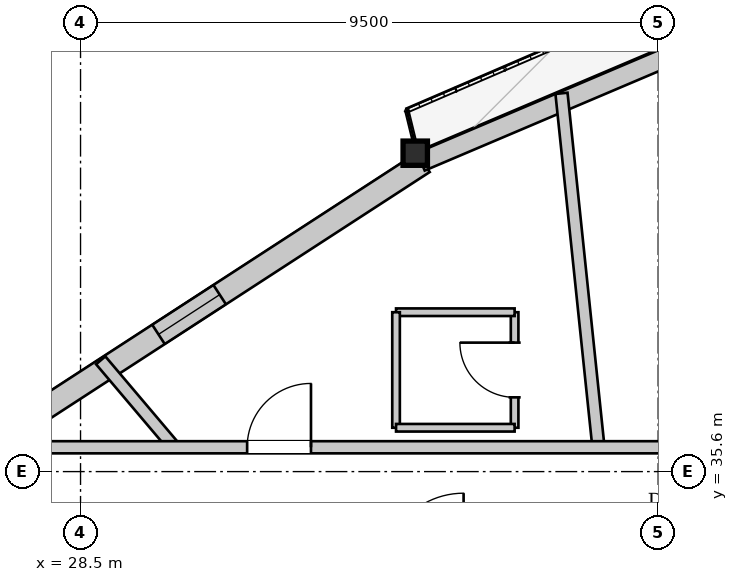
"""IFC4 building model, lengths in metres.
Left out: names, types, materials, properties, quantities, classifications, styles, units other than length and angle.
Written with IfcOpenShell. Run it as: python <this file> out.ifc"""

import sys

from ifc_helpers import new_model, si_unit, direction, frame, frame_2d, origin, origin_2d, place, context, subcontext, project, spatial, rectangle, i_section, extrude, source, transform, mapped, element, fill, save


model = new_model("IFC4")
c1 = context("Model", 3, precision=1e-05, world=origin(), true_north=direction((0.0, 1.0)))
c2 = subcontext(c1, "Body", "Model", "MODEL_VIEW")
j1 = project(units=[si_unit("LENGTHUNIT", "METRE"), si_unit("PLANEANGLEUNIT", "RADIAN")], contexts=[c1])
p1 = place(None, origin())
s1 = spatial("IfcSite", under=j1, at=p1, CompositionType="ELEMENT")
p2 = place(p1, origin())
s2 = spatial("IfcBuilding", under=s1, at=p2, CompositionType="ELEMENT")
p3 = place(p2, frame((0.0, 0.0, 248.9)))
s3 = spatial("IfcBuildingStorey", under=s2, at=p3, CompositionType="ELEMENT", Elevation=248.9)
m1 = source(origin(), c2, "Body", "SweptSolid", [
    extrude(i_section(OverallWidth=0.401, OverallDepth=0.399, WebThickness=0.022, FlangeThickness=0.034, at=origin_2d()), origin(), (0.0, 0.0, 1.0), 3.436),
])
p4 = place(p3, frame((34.036, 40.845, 0.0), z_axis=(-0.018120454418, -0.0051163636, 0.999822720264), x_axis=(0.271729070223, -0.962373790372, 0.0)))
e1 = element("IfcColumn", 1, at=p4, inside=s3, PredefinedType="COLUMN", context=c2, shape_type="MappedRepresentation", body=[
    mapped(m1, transform((0.0, 0.0, 0.0), x_axis=(1.0, 0.0, 0.0), y_axis=(0.0, 1.0, 0.0), z_axis=(0.0, 0.0, 1.0), scale=1.0)),
])
p5 = place(p3, frame((15.584, 28.637, 0.0), z_axis=(0.0, 0.0, 1.0), x_axis=(0.838692120157, 0.544605846083, 0.0)))
e2 = element("IfcWall", 2, at=p5, inside=s3, PredefinedType="SOLIDWALL", context=c2, shape_type="SweptSolid", body=[
    extrude(rectangle(XDim=22.124, YDim=0.38, at=frame_2d((11.062, 0.0))), origin(), (0.0, 0.0, 1.0), 2.872),
])
p6 = place(p5, frame((5.595, 0.0, 0.65)))
e3 = element("IfcOpeningElement", 3, at=p6, cuts=e2, PredefinedType="OPENING", context=c2, shape_type="SweptSolid", body=[
    extrude(rectangle(XDim=1.2, YDim=1.5, at=frame_2d((0.6, 0.75))), frame((0.0, 0.2, 0.0), z_axis=(0.0, -1.0, 0.0), x_axis=(1.0, 0.0, 0.0)), (0.0, 0.0, 1.0), 0.4),
])
p7 = place(p5, frame((16.929, 0.0, 0.65)))
e4 = element("IfcOpeningElement", 4, at=p7, cuts=e2, PredefinedType="OPENING", context=c2, shape_type="SweptSolid", body=[
    extrude(rectangle(XDim=1.2, YDim=1.5, at=frame_2d((0.6, 0.75))), frame((0.0, 0.2, 0.0), z_axis=(0.0, -1.0, 0.0), x_axis=(1.0, 0.0, 0.0)), (0.0, 0.0, 1.0), 0.4),
])
p8 = place(p3, frame((34.098, 40.698, 0.0), z_axis=(0.0, 0.0, 1.0), x_axis=(0.920439131347, 0.390885923877, 0.0)))
e5 = element("IfcWall", 5, at=p8, inside=s3, PredefinedType="SOLIDWALL", context=c2, shape_type="SweptSolid", body=[
    extrude(rectangle(XDim=22.124, YDim=0.32, at=frame_2d((11.062, 0.0))), origin(), (0.0, 0.0, 1.0), 2.872),
])
p9 = place(p8, frame((6.33, 0.0, 0.0)))
e6 = element("IfcOpeningElement", 6, at=p9, cuts=e5, PredefinedType="OPENING", context=c2, shape_type="SweptSolid", body=[
    extrude(rectangle(XDim=1.5, YDim=2.3, at=frame_2d((0.75, 1.15))), frame((0.0, 0.17, 0.0), z_axis=(0.0, -1.0, 0.0), x_axis=(1.0, 0.0, 0.0)), (0.0, 0.0, 1.0), 0.34),
])
p10 = place(p8, frame((17.272, 0.0, 0.402)))
e7 = element("IfcOpeningElement", 7, at=p10, cuts=e5, PredefinedType="OPENING", context=c2, shape_type="SweptSolid", body=[
    extrude(rectangle(XDim=2.6, YDim=2.35, at=frame_2d((1.3, 1.175))), frame((0.0, 0.17, 0.0), z_axis=(0.0, -1.0, 0.0), x_axis=(1.0, 0.0, 0.0)), (0.0, 0.0, 1.0), 0.34),
])
p11 = place(p3, frame((37.018, 36.0, 0.0), z_axis=(0.0, 0.0, 1.0), x_axis=(-0.103876913676, 0.994590160219, 0.0)))
e8 = element("IfcWall", 8, at=p11, inside=s3, PredefinedType="PARTITIONING", context=c2, shape_type="SweptSolid", body=[
    extrude(rectangle(XDim=5.852, YDim=0.2, at=frame_2d((2.926, 0.0))), origin(), (0.0, 0.0, 1.0), 3.38),
])
p12 = place(p3, frame((30.042, 36.0, 0.0), z_axis=(0.0, 0.0, 1.0), x_axis=(-0.646099953322, 0.763252808916, 0.0)))
e9 = element("IfcWall", 9, at=p12, inside=s3, PredefinedType="PARTITIONING", context=c2, shape_type="SweptSolid", body=[
    extrude(rectangle(XDim=1.874, YDim=0.2, at=frame_2d((0.937, 0.0))), origin(), (0.0, 0.0, 1.0), 3.38),
])
p13 = place(p3, frame((35.639, 36.321, 0.0), z_axis=(0.0, 0.0, 1.0), x_axis=(0.0, 1.0, 0.0)))
e10 = element("IfcWall", 10, at=p13, inside=s3, PredefinedType="PARTITIONING", context=c2, shape_type="SweptSolid", body=[
    extrude(rectangle(XDim=1.9, YDim=0.125, at=frame_2d((0.95, 0.0))), origin(), (0.0, 0.0, 1.0), 3.38),
])
p14 = place(p13, frame((0.5, 0.0, 0.0)))
e11 = element("IfcOpeningElement", 11, at=p14, cuts=e10, PredefinedType="OPENING", context=c2, shape_type="SweptSolid", body=[
    extrude(rectangle(XDim=0.9, YDim=2.1, at=frame_2d((0.45, 1.05))), frame((0.0, 0.073, 0.0), z_axis=(0.0, -1.0, 0.0), x_axis=(1.0, 0.0, 0.0)), (0.0, 0.0, 1.0), 0.145),
])
p15 = place(p3, frame((35.639, 38.221, 0.0), z_axis=(0.0, 0.0, 1.0), x_axis=(-1.0, 0.0, 0.0)))
e12 = element("IfcWall", 12, at=p15, inside=s3, PredefinedType="PARTITIONING", context=c2, shape_type="SweptSolid", body=[
    extrude(rectangle(XDim=1.95, YDim=0.125, at=frame_2d((0.975, 0.0))), origin(), (0.0, 0.0, 1.0), 3.125),
])
p16 = place(p3, frame((33.689, 38.221, 0.0), z_axis=(0.0, 0.0, 1.0), x_axis=(0.0, -1.0, 0.0)))
e13 = element("IfcWall", 13, at=p16, inside=s3, PredefinedType="PARTITIONING", context=c2, shape_type="SweptSolid", body=[
    extrude(rectangle(XDim=1.9, YDim=0.125, at=frame_2d((0.95, 0.0))), origin(), (0.0, 0.0, 1.0), 3.38),
])
p17 = place(p3, frame((33.689, 36.321, 0.0), z_axis=(0.0, 0.0, 1.0), x_axis=(1.0, 0.0, 0.0)))
e14 = element("IfcWall", 14, at=p17, inside=s3, PredefinedType="PARTITIONING", context=c2, shape_type="SweptSolid", body=[
    extrude(rectangle(XDim=1.95, YDim=0.125, at=frame_2d((0.975, 0.0))), origin(), (0.0, 0.0, 1.0), 3.38),
])
p18 = place(p3, frame((27.8, 36.0, 0.0), z_axis=(0.0, 0.0, 1.0), x_axis=(1.0, 0.0, 0.0)))
e15 = element("IfcWall", 15, at=p18, inside=s3, PredefinedType="PARTITIONING", context=c2, shape_type="SweptSolid", body=[
    extrude(rectangle(XDim=13.2, YDim=0.2, at=frame_2d((6.6, 0.0))), origin(), (0.0, 0.0, 1.0), 3.38),
])
p19 = place(p18, frame((11.199, 0.0, 0.0)))
e16 = element("IfcOpeningElement", 16, at=p19, cuts=e15, PredefinedType="OPENING", context=c2, shape_type="SweptSolid", body=[
    extrude(rectangle(XDim=1.05, YDim=2.2, at=frame_2d((0.525, 1.1))), frame((0.0, 0.11, 0.0), z_axis=(0.0, -1.0, 0.0), x_axis=(1.0, 0.0, 0.0)), (0.0, 0.0, 1.0), 0.22),
])
p20 = place(p18, frame((3.44, 0.0, 0.0)))
e17 = element("IfcOpeningElement", 17, at=p20, cuts=e15, PredefinedType="OPENING", context=c2, shape_type="SweptSolid", body=[
    extrude(rectangle(XDim=1.05, YDim=2.2, at=frame_2d((0.525, 1.1))), frame((0.0, 0.11, 0.0), z_axis=(0.0, -1.0, 0.0), x_axis=(1.0, 0.0, 0.0)), (0.0, 0.0, 1.0), 0.22),
])
m2 = source(origin(), c2, "Body", "SweptSolid", [
    extrude(rectangle(XDim=1.2, YDim=1.5, at=frame_2d((0.6, 0.75))), frame((0.0, 0.03, 0.0), z_axis=(0.0, -1.0, 0.0), x_axis=(1.0, 0.0, 0.0)), (0.0, 0.0, 1.0), 0.06),
])
p21 = place(p7, origin())
e18 = element("IfcWindow", 18, at=p21, inside=s3, PartitioningType="SINGLE_PANEL", PredefinedType="WINDOW", context=c2, shape_type="MappedRepresentation", body=[
    mapped(m2, transform((0.0, 0.0, 0.0), x_axis=(1.0, 0.0, 0.0), y_axis=(0.0, 1.0, 0.0), z_axis=(0.0, 0.0, 1.0), scale=1.0)),
])
fill(e4, e18)
m3 = source(origin(), c2, "Body", "SweptSolid", [
    extrude(rectangle(XDim=0.9, YDim=2.1, at=frame_2d((0.45, 1.05))), frame((0.0, 0.025, 0.0), z_axis=(0.0, -1.0, 0.0), x_axis=(1.0, 0.0, 0.0)), (0.0, 0.0, 1.0), 0.05),
])
p22 = place(p14, origin())
e19 = element("IfcDoor", 19, at=p22, inside=s3, OperationType="SINGLE_SWING_RIGHT", PredefinedType="DOOR", context=c2, shape_type="MappedRepresentation", body=[
    mapped(m3, transform((0.0, 0.0, 0.0), x_axis=(1.0, 0.0, 0.0), y_axis=(0.0, 1.0, 0.0), z_axis=(0.0, 0.0, 1.0), scale=1.0)),
])
fill(e11, e19)
m4 = source(origin(), c2, "Body", "SweptSolid", [
    extrude(rectangle(XDim=1.05, YDim=2.2, at=frame_2d((0.525, 1.1))), frame((0.0, 0.025, 0.0), z_axis=(0.0, -1.0, 0.0), x_axis=(1.0, 0.0, 0.0)), (0.0, 0.0, 1.0), 0.05),
])
p23 = place(p20, origin())
e20 = element("IfcDoor", 20, at=p23, inside=s3, OperationType="SINGLE_SWING_RIGHT", PredefinedType="DOOR", context=c2, shape_type="MappedRepresentation", body=[
    mapped(m4, transform((0.0, 0.0, 0.0), x_axis=(1.0, 0.0, 0.0), y_axis=(0.0, 1.0, 0.0), z_axis=(0.0, 0.0, 1.0), scale=1.0)),
])
fill(e17, e20)
save(model, sys.argv[1])
